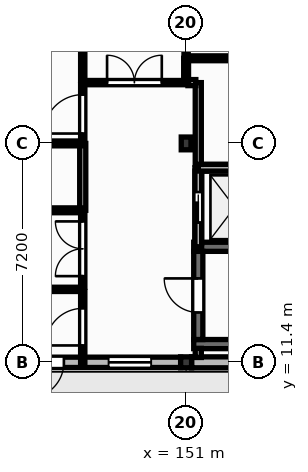
"""IFC4 building model, lengths in metres.
Left out: names, types, materials, properties, quantities, classifications, styles, units other than length and angle.
Written with IfcOpenShell. Run it as: python <this file> out.ifc"""

import sys

from ifc_helpers import new_model, si_unit, direction, frame, frame_2d, origin, origin_2d, place, context, subcontext, project, spatial, rectangle, extrude, element, fill, save


model = new_model("IFC4")
c1 = context("Model", 3, precision=1e-05, world=origin(), true_north=direction((0.0, 1.0)))
c2 = subcontext(c1, "Body", "Model", "MODEL_VIEW")
j1 = project(units=[si_unit("LENGTHUNIT", "METRE"), si_unit("PLANEANGLEUNIT", "RADIAN")], contexts=[c1])
p1 = place(None, origin())
s1 = spatial("IfcSite", under=j1, at=p1, CompositionType="ELEMENT")
p2 = place(p1, origin())
s2 = spatial("IfcBuilding", under=s1, at=p2, CompositionType="ELEMENT")
p3 = place(p2, frame((0.0, 0.0, 4.5)))
s3 = spatial("IfcBuildingStorey", under=s2, at=p3, CompositionType="ELEMENT", Elevation=4.5)
p4 = place(p3, frame((151.0, 11.4, 0.0), z_axis=(0.0, 0.0, 1.0), x_axis=(1.0, 0.0, 0.0)))
e1 = element("IfcColumn", 1, at=p4, inside=s3, PredefinedType="COLUMN", context=c2, shape_type="SweptSolid", body=[
    extrude(rectangle(XDim=0.36, YDim=0.36, at=origin_2d()), origin(), (0.0, 0.0, 1.0), 4.26),
])
p5 = place(p3, frame((151.0, 18.6, 0.0), z_axis=(0.0, 0.0, 1.0), x_axis=(1.0, 0.0, 0.0)))
e2 = element("IfcColumn", 2, at=p5, inside=s3, PredefinedType="COLUMN", context=c2, shape_type="SweptSolid", body=[
    extrude(rectangle(XDim=0.32, YDim=0.42, at=origin_2d()), origin(), (0.0, 0.0, 1.0), 4.26),
])
p6 = place(p3, frame((144.05, 11.4, 0.0), z_axis=(0.0, 0.0, 1.0), x_axis=(1.0, 0.0, 0.0)))
e3 = element("IfcWall", 3, at=p6, inside=s3, PredefinedType="SOLIDWALL", context=c2, shape_type="SweptSolid", body=[
    extrude(rectangle(XDim=6.77, YDim=0.34, at=frame_2d((3.385, 0.0))), origin(), (0.0, 0.0, 1.0), 3.76),
])
p7 = place(p6, frame((1.75, 0.0, 0.0)))
e4 = element("IfcOpeningElement", 4, at=p7, cuts=e3, PredefinedType="OPENING", context=c2, shape_type="SweptSolid", body=[
    extrude(rectangle(XDim=1.18, YDim=2.2, at=frame_2d((0.59, 1.1))), frame((0.0, 0.18, 0.0), z_axis=(0.0, -1.0, 0.0), x_axis=(1.0, 0.0, 0.0)), (0.0, 0.0, 1.0), 0.36),
])
p8 = place(p6, frame((4.4, 0.0, 1.05)))
e5 = element("IfcOpeningElement", 5, at=p8, cuts=e3, PredefinedType="OPENING", context=c2, shape_type="SweptSolid", body=[
    extrude(rectangle(XDim=1.4, YDim=1.65, at=frame_2d((0.7, 0.825))), frame((0.0, 0.18, 0.0), z_axis=(0.0, -1.0, 0.0), x_axis=(1.0, 0.0, 0.0)), (0.0, 0.0, 1.0), 0.36),
])
p9 = place(p3, frame((151.18, 11.4, 0.0), z_axis=(0.0, 0.0, 1.0), x_axis=(1.0, 0.0, 0.0)))
e6 = element("IfcWall", 6, at=p9, inside=s3, PredefinedType="SOLIDWALL", context=c2, shape_type="SweptSolid", body=[
    extrude(rectangle(XDim=6.86, YDim=0.36, at=frame_2d((3.43, 0.0))), origin(), (0.0, 0.0, 1.0), 3.8),
])
for number, where, z_axis, x_axis in (
    (7, (151.25, 12.0, 0.0), (0.0, 0.0, 1.0), (1.0, 0.0, 0.0)),
    (8, (151.25, 15.2, 0.0), (0.0, 0.0, 1.0), (1.0, 0.0, 0.0)),
):
    element("IfcWall", number, at=place(p3, frame(where, z_axis=z_axis, x_axis=x_axis)), inside=s3, PredefinedType="SHEAR", context=c2, shape_type="SweptSolid", body=[
        extrude(rectangle(XDim=6.7, YDim=0.3, at=frame_2d((3.35, 0.0))), origin(), (0.0, 0.0, 1.0), 4.25),
    ])
p10 = place(p3, frame((151.4, 12.15, 0.0), z_axis=(0.0, 0.0, 1.0), x_axis=(0.0, 1.0, 0.0)))
e9 = element("IfcWall", 9, at=p10, inside=s3, PredefinedType="SHEAR", context=c2, shape_type="SweptSolid", body=[
    extrude(rectangle(XDim=2.9, YDim=0.3, at=frame_2d((1.45, 0.0))), origin(), (0.0, 0.0, 1.0), 4.25),
])
p11 = place(p10, frame((0.89, 0.0, 0.0)))
e10 = element("IfcOpeningElement", 10, at=p11, cuts=e9, PredefinedType="OPENING", context=c2, shape_type="SweptSolid", body=[
    extrude(rectangle(XDim=1.12, YDim=2.1, at=frame_2d((0.56, 1.05))), frame((0.0, 0.16, 0.0), z_axis=(0.0, -1.0, 0.0), x_axis=(1.0, 0.0, 0.0)), (0.0, 0.0, 1.0), 0.32),
])
p12 = place(p3, frame((151.4, 17.8, 0.0), z_axis=(0.0, 0.0, 1.0), x_axis=(1.0, 0.0, 0.0)))
e11 = element("IfcWall", 11, at=p12, inside=s3, PredefinedType="SOLIDWALL", context=c2, shape_type="SweptSolid", body=[
    extrude(rectangle(XDim=2.4, YDim=0.22, at=frame_2d((1.2, 0.0))), origin(), (0.0, 0.0, 1.0), 4.25),
])
p13 = place(p3, frame((151.4, 15.31, 0.0), z_axis=(0.0, 0.0, 1.0), x_axis=(0.0, 1.0, 0.0)))
e12 = element("IfcWall", 12, at=p13, inside=s3, PredefinedType="SOLIDWALL", context=c2, shape_type="SweptSolid", body=[
    extrude(rectangle(XDim=2.38, YDim=0.22, at=frame_2d((1.19, 0.0))), origin(), (0.0, 0.0, 1.0), 4.25),
])
p14 = place(p13, frame((0.69, 0.0, 0.0)))
e13 = element("IfcOpeningElement", 13, at=p14, cuts=e12, PredefinedType="OPENING", context=c2, shape_type="SweptSolid", body=[
    extrude(rectangle(XDim=1.0, YDim=2.15, at=frame_2d((0.5, 1.075))), frame((0.0, 0.12, 0.0), z_axis=(0.0, -1.0, 0.0), x_axis=(1.0, 0.0, 0.0)), (0.0, 0.0, 1.0), 0.24),
])
p15 = place(p3, frame((151.4, 15.2, -0.9), z_axis=(0.0, 0.0, 1.0), x_axis=(0.0, 1.0, 0.0)))
e14 = element("IfcWall", 14, at=p15, inside=s3, PredefinedType="SOLIDWALL", context=c2, shape_type="SweptSolid", body=[
    extrude(rectangle(XDim=2.6, YDim=0.22, at=frame_2d((1.3, 0.0))), origin(), (0.0, 0.0, 1.0), 0.9),
])
p16 = place(p3, frame((151.4, 17.8, -0.9), z_axis=(0.0, 0.0, 1.0), x_axis=(1.0, 0.0, 0.0)))
e15 = element("IfcWall", 15, at=p16, inside=s3, PredefinedType="SOLIDWALL", context=c2, shape_type="SweptSolid", body=[
    extrude(rectangle(XDim=2.4, YDim=0.22, at=frame_2d((1.2, 0.0))), origin(), (0.0, 0.0, 1.0), 0.9),
])
p17 = place(p3, frame((143.8, 13.8, 0.0), z_axis=(0.0, 0.0, 1.0), x_axis=(1.0, 0.0, 0.0)))
e16 = element("IfcWall", 16, at=p17, inside=s3, PredefinedType="PARTITIONING", context=c2, shape_type="SweptSolid", body=[
    extrude(rectangle(XDim=3.8, YDim=0.14, at=frame_2d((1.9, 0.0))), origin(), (0.0, 0.0, 1.0), 4.18),
])
p18 = place(p17, frame((1.44, 0.0, 0.0)))
e17 = element("IfcOpeningElement", 17, at=p18, cuts=e16, PredefinedType="OPENING", context=c2, shape_type="SweptSolid", body=[
    extrude(rectangle(XDim=0.92, YDim=2.1, at=frame_2d((0.46, 1.05))), frame((0.0, 0.08, 0.0), z_axis=(0.0, -1.0, 0.0), x_axis=(1.0, 0.0, 0.0)), (0.0, 0.0, 1.0), 0.16),
])
p19 = place(p3, frame((147.6, 11.4, 0.0), z_axis=(0.0, 0.0, 1.0), x_axis=(0.0, 1.0, 0.0)))
e18 = element("IfcWall", 18, at=p19, inside=s3, PredefinedType="PARTITIONING", context=c2, shape_type="SweptSolid", body=[
    extrude(rectangle(XDim=2.33, YDim=0.14, at=frame_2d((1.165, 0.0))), origin(), (0.0, 0.0, 1.0), 4.18),
])
p20 = place(p19, frame((0.555, 0.0, 0.0)))
e19 = element("IfcOpeningElement", 19, at=p20, cuts=e18, PredefinedType="OPENING", context=c2, shape_type="SweptSolid", body=[
    extrude(rectangle(XDim=1.22, YDim=2.1, at=frame_2d((0.61, 1.05))), frame((0.0, 0.08, 0.0), z_axis=(0.0, -1.0, 0.0), x_axis=(1.0, 0.0, 0.0)), (0.0, 0.0, 1.0), 0.16),
])
p21 = place(p3, frame((147.6, 13.87, 0.0), z_axis=(0.0, 0.0, 1.0), x_axis=(0.0, 1.0, 0.0)))
e20 = element("IfcWall", 20, at=p21, inside=s3, PredefinedType="PARTITIONING", context=c2, shape_type="SweptSolid", body=[
    extrude(rectangle(XDim=2.53, YDim=0.14, at=frame_2d((1.265, 0.0))), origin(), (0.0, 0.0, 1.0), 4.18),
])
p22 = place(p21, frame((0.365, 0.0, 0.0)))
e21 = element("IfcOpeningElement", 21, at=p22, cuts=e20, PredefinedType="OPENING", context=c2, shape_type="SweptSolid", body=[
    extrude(rectangle(XDim=1.8, YDim=2.3, at=frame_2d((0.9, 1.15))), frame((0.0, 0.08, 0.0), z_axis=(0.0, -1.0, 0.0), x_axis=(1.0, 0.0, 0.0)), (0.0, 0.0, 1.0), 0.16),
])
p23 = place(p3, frame((147.6, 18.6, 0.0), z_axis=(0.0, 0.0, 1.0), x_axis=(0.0, 1.0, 0.0)))
e22 = element("IfcWall", 22, at=p23, inside=s3, PredefinedType="PARTITIONING", context=c2, shape_type="SweptSolid", body=[
    extrude(rectangle(XDim=1.93, YDim=0.14, at=frame_2d((0.965, 0.0))), origin(), (0.0, 0.0, 1.0), 4.18),
])
p24 = place(p23, frame((0.325, 0.0, 0.0)))
e23 = element("IfcOpeningElement", 23, at=p24, cuts=e22, PredefinedType="OPENING", context=c2, shape_type="SweptSolid", body=[
    extrude(rectangle(XDim=1.28, YDim=2.2, at=frame_2d((0.64, 1.1))), frame((0.0, 0.08, 0.0), z_axis=(0.0, -1.0, 0.0), x_axis=(1.0, 0.0, 0.0)), (0.0, 0.0, 1.0), 0.16),
])
p25 = place(p3, frame((147.6, 20.67, 0.0), z_axis=(0.0, 0.0, 1.0), x_axis=(0.0, 1.0, 0.0)))
e24 = element("IfcWall", 24, at=p25, inside=s3, PredefinedType="PARTITIONING", context=c2, shape_type="SweptSolid", body=[
    extrude(rectangle(XDim=2.667, YDim=0.14, at=frame_2d((1.333, 0.0))), origin(), (0.0, 0.0, 1.0), 4.18),
])
p26 = place(p3, frame((147.6, 20.6, 0.0), z_axis=(0.0, 0.0, 1.0), x_axis=(1.0, 0.0, 0.0)))
e25 = element("IfcWall", 25, at=p26, inside=s3, PredefinedType="PARTITIONING", context=c2, shape_type="SweptSolid", body=[
    extrude(rectangle(XDim=3.4, YDim=0.14, at=frame_2d((1.7, 0.0))), origin(), (0.0, 0.0, 1.0), 4.18),
])
p27 = place(p26, frame((0.8, 0.0, 0.0)))
e26 = element("IfcOpeningElement", 26, at=p27, cuts=e25, PredefinedType="OPENING", context=c2, shape_type="SweptSolid", body=[
    extrude(rectangle(XDim=1.8, YDim=2.3, at=frame_2d((0.9, 1.15))), frame((0.0, 0.08, 0.0), z_axis=(0.0, -1.0, 0.0), x_axis=(1.0, 0.0, 0.0)), (0.0, 0.0, 1.0), 0.16),
])
p28 = place(p3, frame((151.0, 21.4, 0.0), z_axis=(0.0, 0.0, 1.0), x_axis=(0.0, 1.0, 0.0)))
e27 = element("IfcWall", 27, at=p28, inside=s3, PredefinedType="PARTITIONING", context=c2, shape_type="SweptSolid", body=[
    extrude(rectangle(XDim=2.6, YDim=0.14, at=frame_2d((1.3, 0.0))), origin(), (0.0, 0.0, 1.0), 3.62),
])
p29 = place(p28, frame((0.85, 0.0, 0.0)))
e28 = element("IfcOpeningElement", 28, at=p29, cuts=e27, PredefinedType="OPENING", context=c2, shape_type="SweptSolid", body=[
    extrude(rectangle(XDim=0.9, YDim=2.1, at=frame_2d((0.45, 1.05))), frame((0.0, 0.08, 0.0), z_axis=(0.0, -1.0, 0.0), x_axis=(1.0, 0.0, 0.0)), (0.0, 0.0, 1.0), 0.16),
])
p30 = place(p3, frame((151.4, 11.56, 0.0), z_axis=(0.0, 0.0, 1.0), x_axis=(0.0, 1.0, 0.0)))
e29 = element("IfcWall", 29, at=p30, inside=s3, PredefinedType="PARTITIONING", context=c2, shape_type="SweptSolid", body=[
    extrude(rectangle(XDim=0.3, YDim=0.2, at=frame_2d((0.15, 0.0))), origin(), (0.0, 0.0, 1.0), 4.18),
])
p31 = place(p3, frame((151.4, 17.91, 0.0), z_axis=(0.0, 0.0, 1.0), x_axis=(0.0, 1.0, 0.0)))
e30 = element("IfcWall", 30, at=p31, inside=s3, PredefinedType="PARTITIONING", context=c2, shape_type="SweptSolid", body=[
    extrude(rectangle(XDim=2.69, YDim=0.2, at=frame_2d((1.345, 0.0))), origin(), (0.0, 0.0, 1.0), 4.18),
])
p32 = place(p3, frame((151.32, 20.6, 0.0), z_axis=(0.0, 0.0, 1.0), x_axis=(-1.0, 0.0, 0.0)))
e31 = element("IfcWall", 31, at=p32, inside=s3, PredefinedType="PARTITIONING", context=c2, shape_type="SweptSolid", body=[
    extrude(rectangle(XDim=0.26, YDim=0.2, at=frame_2d((0.13, 0.0))), origin(), (0.0, 0.0, 1.0), 4.18),
])
p33 = place(p3, frame((147.6, 16.4, 0.0), z_axis=(0.0, 0.0, 1.0), x_axis=(0.0, 1.0, 0.0)))
e32 = element("IfcWall", 32, at=p33, inside=s3, PredefinedType="PARTITIONING", context=c2, shape_type="SweptSolid", body=[
    extrude(rectangle(XDim=2.2, YDim=0.2, at=frame_2d((1.1, 0.0))), origin(), (0.0, 0.0, 1.0), 4.18),
])
p34 = place(p3, frame((147.6, 16.4, 0.0), z_axis=(0.0, 0.0, 1.0), x_axis=(-1.0, 0.0, 0.0)))
e33 = element("IfcWall", 33, at=p34, inside=s3, PredefinedType="PARTITIONING", context=c2, shape_type="SweptSolid", body=[
    extrude(rectangle(XDim=11.0, YDim=0.16, at=frame_2d((5.5, 0.0))), origin(), (0.0, 0.0, 1.0), 4.18),
])
p35 = place(p3, frame((151.0, 20.67, 0.0), z_axis=(0.0, 0.0, 1.0), x_axis=(0.0, 1.0, 0.0)))
e34 = element("IfcWall", 34, at=p35, inside=s3, PredefinedType="PARTITIONING", context=c2, shape_type="SweptSolid", body=[
    extrude(rectangle(XDim=0.73, YDim=0.16, at=frame_2d((0.365, 0.0))), origin(), (0.0, 0.0, 1.0), 3.62),
])
p36 = place(p3, frame((151.0, 21.4, 0.0), z_axis=(0.0, 0.0, 1.0), x_axis=(1.0, 0.0, 0.0)))
e35 = element("IfcWall", 35, at=p36, inside=s3, PredefinedType="PARTITIONING", context=c2, shape_type="SweptSolid", body=[
    extrude(rectangle(XDim=3.2, YDim=0.16, at=frame_2d((1.6, 0.0))), origin(), (0.0, 0.0, 1.0), 4.18),
])
p37 = place(p3, frame((144.05, 18.6, 0.0), z_axis=(0.0, 0.0, 1.0), x_axis=(1.0, 0.0, 0.0)))
e36 = element("IfcWall", 36, at=p37, inside=s3, PredefinedType="PARTITIONING", context=c2, shape_type="SweptSolid", body=[
    extrude(rectangle(XDim=3.55, YDim=0.16, at=frame_2d((1.775, 0.0))), origin(), (0.0, 0.0, 1.0), 3.58),
])
p38 = place(p7, frame((1.18, 0.0, 0.0), z_axis=(0.0, 0.0, 1.0), x_axis=(-1.0, 0.0, 0.0)))
e37 = element("IfcDoor", 37, at=p38, inside=s3, OperationType="SINGLE_SWING_RIGHT", PredefinedType="DOOR", context=c2, shape_type="SweptSolid", body=[
    extrude(rectangle(XDim=1.18, YDim=2.2, at=frame_2d((0.59, 1.1))), frame((0.0, 0.025, 0.0), z_axis=(0.0, -1.0, 0.0), x_axis=(1.0, 0.0, 0.0)), (0.0, 0.0, 1.0), 0.05),
])
fill(e4, e37)
p39 = place(p8, origin())
e38 = element("IfcWindow", 38, at=p39, inside=s3, PartitioningType="SINGLE_PANEL", PredefinedType="WINDOW", context=c2, shape_type="SweptSolid", body=[
    extrude(rectangle(XDim=1.4, YDim=1.65, at=frame_2d((0.7, 0.825))), frame((0.0, 0.03, 0.0), z_axis=(0.0, -1.0, 0.0), x_axis=(1.0, 0.0, 0.0)), (0.0, 0.0, 1.0), 0.06),
])
fill(e5, e38)
p40 = place(p14, origin())
e39 = element("IfcDoor", 39, at=p40, inside=s3, OperationType="SLIDING_TO_LEFT", PredefinedType="DOOR", context=c2, shape_type="SweptSolid", body=[
    extrude(rectangle(XDim=1.0, YDim=2.15, at=frame_2d((0.5, 1.075))), frame((0.0, 0.025, 0.0), z_axis=(0.0, -1.0, 0.0), x_axis=(1.0, 0.0, 0.0)), (0.0, 0.0, 1.0), 0.05),
])
fill(e13, e39)
p41 = place(p11, origin())
e40 = element("IfcDoor", 40, at=p41, inside=s3, OperationType="SINGLE_SWING_RIGHT", PredefinedType="DOOR", context=c2, shape_type="SweptSolid", body=[
    extrude(rectangle(XDim=1.12, YDim=2.1, at=frame_2d((0.56, 1.05))), frame((0.0, 0.025, 0.0), z_axis=(0.0, -1.0, 0.0), x_axis=(1.0, 0.0, 0.0)), (0.0, 0.0, 1.0), 0.05),
])
fill(e10, e40)
p42 = place(p22, origin())
e41 = element("IfcDoor", 41, at=p42, inside=s3, OperationType="DOUBLE_DOOR_SINGLE_SWING", PredefinedType="DOOR", context=c2, shape_type="SweptSolid", body=[
    extrude(rectangle(XDim=1.8, YDim=2.3, at=frame_2d((0.9, 1.15))), frame((0.0, 0.025, 0.0), z_axis=(0.0, -1.0, 0.0), x_axis=(1.0, 0.0, 0.0)), (0.0, 0.0, 1.0), 0.05),
])
fill(e21, e41)
p43 = place(p20, origin())
e42 = element("IfcDoor", 42, at=p43, inside=s3, OperationType="SINGLE_SWING_LEFT", PredefinedType="DOOR", context=c2, shape_type="SweptSolid", body=[
    extrude(rectangle(XDim=1.22, YDim=2.1, at=frame_2d((0.61, 1.05))), frame((0.0, 0.025, 0.0), z_axis=(0.0, -1.0, 0.0), x_axis=(1.0, 0.0, 0.0)), (0.0, 0.0, 1.0), 0.05),
])
fill(e19, e42)
p44 = place(p27, origin())
e43 = element("IfcDoor", 43, at=p44, inside=s3, OperationType="DOUBLE_DOOR_SINGLE_SWING", PredefinedType="DOOR", context=c2, shape_type="SweptSolid", body=[
    extrude(rectangle(XDim=1.8, YDim=2.3, at=frame_2d((0.9, 1.15))), frame((0.0, 0.025, 0.0), z_axis=(0.0, -1.0, 0.0), x_axis=(1.0, 0.0, 0.0)), (0.0, 0.0, 1.0), 0.05),
])
fill(e26, e43)
p45 = place(p24, origin())
e44 = element("IfcDoor", 44, at=p45, inside=s3, OperationType="SINGLE_SWING_LEFT", PredefinedType="DOOR", context=c2, shape_type="SweptSolid", body=[
    extrude(rectangle(XDim=1.28, YDim=2.2, at=frame_2d((0.64, 1.1))), frame((0.0, 0.025, 0.0), z_axis=(0.0, -1.0, 0.0), x_axis=(1.0, 0.0, 0.0)), (0.0, 0.0, 1.0), 0.05),
])
fill(e23, e44)
save(model, sys.argv[1])
